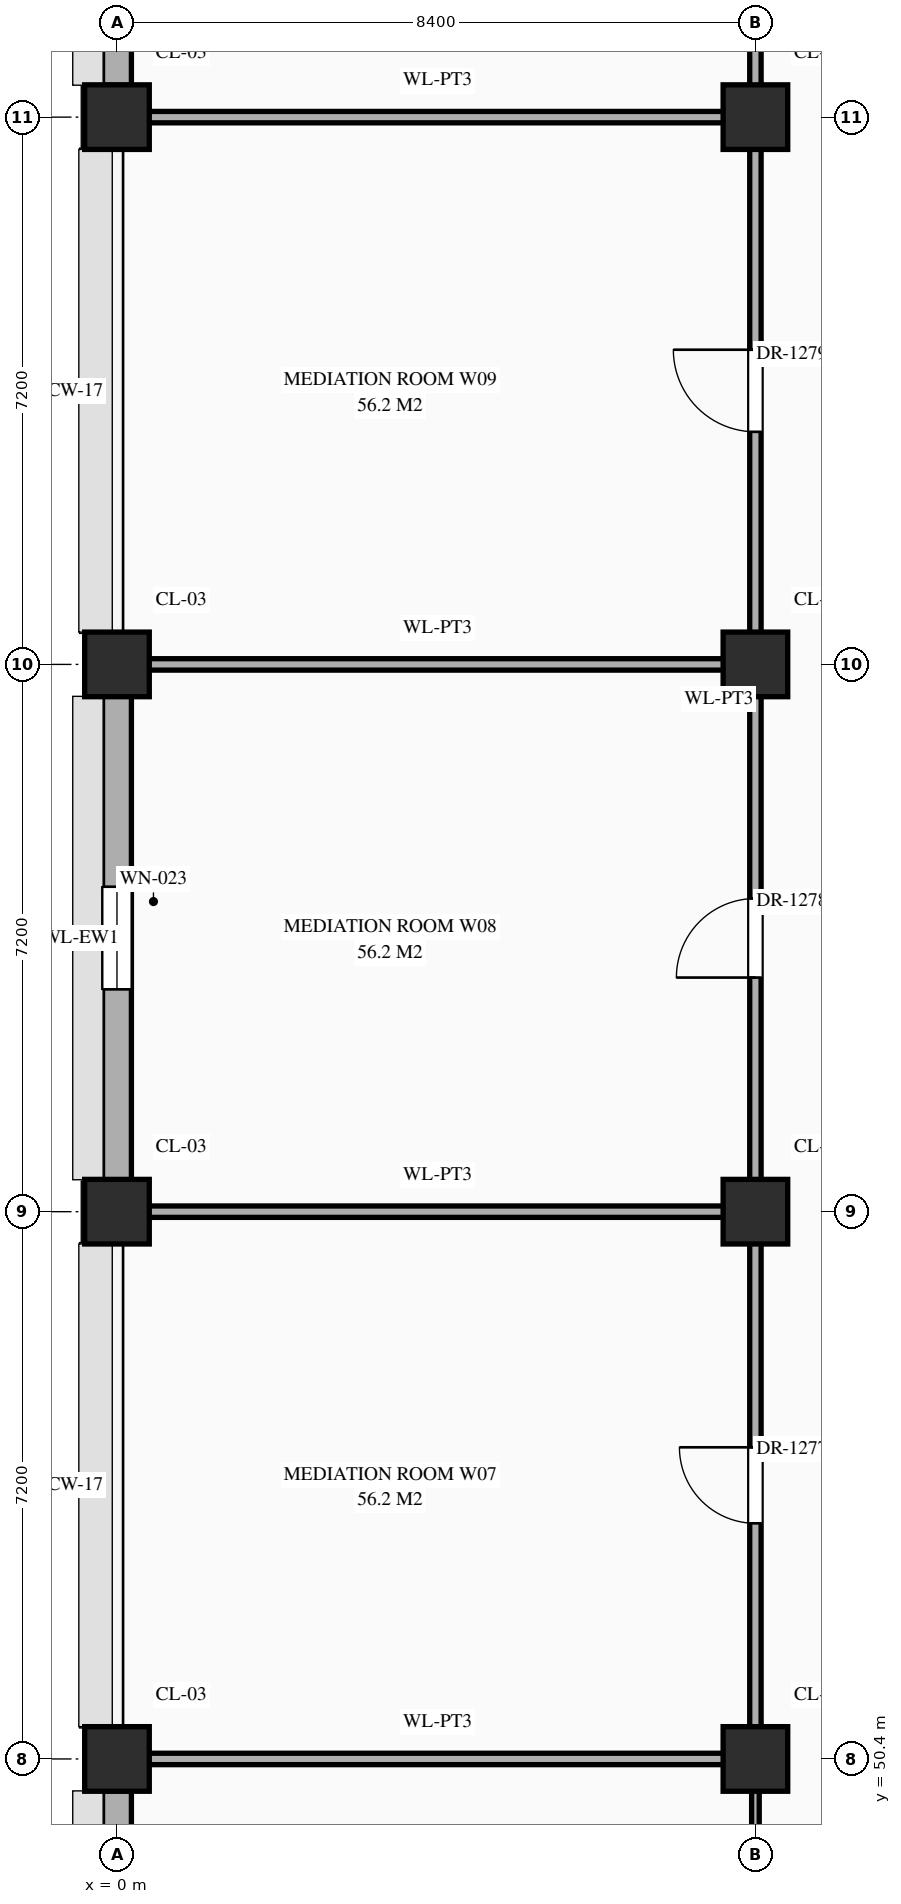
"""IFC4 building model, lengths in metres.
Left out: names, types, materials, properties, quantities, classifications, styles, units other than length and angle.
Written with IfcOpenShell. Run it as: python <this file> out.ifc"""

import sys

from ifc_helpers import new_model, si_unit, direction, frame, frame_2d, origin, origin_2d, place, context, subcontext, project, spatial, rectangle, extrude, element, fill, save


model = new_model("IFC4")
c1 = context("Model", 3, precision=1e-05, world=origin(), true_north=direction((0.0, 1.0)))
c2 = subcontext(c1, "Body", "Model", "MODEL_VIEW")
j1 = project(units=[si_unit("LENGTHUNIT", "METRE"), si_unit("PLANEANGLEUNIT", "RADIAN")], contexts=[c1])
p1 = place(None, origin())
s1 = spatial("IfcSite", under=j1, at=p1, CompositionType="ELEMENT")
p2 = place(p1, origin())
s2 = spatial("IfcBuilding", under=s1, at=p2, CompositionType="ELEMENT")
p3 = place(p2, frame((0.0, 0.0, 5.4)))
s3 = spatial("IfcBuildingStorey", under=s2, at=p3, CompositionType="ELEMENT", Elevation=5.4)
for number, where, z_axis, x_axis in (
    (1, (0.0, 50.4, 0.0), (0.0, 0.0, 1.0), (1.0, 0.0, 0.0)),
    (2, (0.0, 57.6, 0.0), (0.0, 0.0, 1.0), (1.0, 0.0, 0.0)),
    (3, (0.0, 64.8, 0.0), (0.0, 0.0, 1.0), (1.0, 0.0, 0.0)),
    (4, (0.0, 72.0, 0.0), (0.0, 0.0, 1.0), (1.0, 0.0, 0.0)),
    (5, (8.4, 50.4, 0.0), (0.0, 0.0, 1.0), (1.0, 0.0, 0.0)),
    (6, (8.4, 57.6, 0.0), (0.0, 0.0, 1.0), (1.0, 0.0, 0.0)),
    (7, (8.4, 64.8, 0.0), (0.0, 0.0, 1.0), (1.0, 0.0, 0.0)),
    (8, (8.4, 72.0, 0.0), (0.0, 0.0, 1.0), (1.0, 0.0, 0.0)),
):
    element("IfcColumn", number, at=place(p3, frame(where, z_axis=z_axis, x_axis=x_axis)), inside=s3, PredefinedType="COLUMN", context=c2, shape_type="SweptSolid", body=[
        extrude(rectangle(XDim=0.85, YDim=0.85, at=origin_2d()), origin(), (0.0, 0.0, 1.0), 5.4),
    ])
p4 = place(p3, frame((0.0, 43.62, 0.0), z_axis=(0.0, 0.0, 1.0), x_axis=(0.0, 1.0, 0.0)))
e9 = element("IfcWall", 9, at=p4, inside=s3, PredefinedType="STANDARD", context=c2, shape_type="SweptSolid", body=[
    extrude(rectangle(XDim=6.36, YDim=0.38, at=frame_2d((3.18, 0.0))), origin(), (0.0, 0.0, 1.0), 4.47),
])
p5 = place(p4, frame((2.505, 0.0, 0.85)))
e10 = element("IfcOpeningElement", 10, at=p5, cuts=e9, PredefinedType="OPENING", context=c2, shape_type="SweptSolid", body=[
    extrude(rectangle(XDim=1.35, YDim=1.56, at=frame_2d((0.675, 0.78))), frame((0.0, 0.202, 0.0), z_axis=(0.0, -1.0, 0.0), x_axis=(1.0, 0.0, 0.0)), (0.0, 0.0, 1.0), 0.404),
])
p6 = place(p3, frame((0.0, 58.02, 0.0), z_axis=(0.0, 0.0, 1.0), x_axis=(0.0, 1.0, 0.0)))
e11 = element("IfcWall", 11, at=p6, inside=s3, PredefinedType="STANDARD", context=c2, shape_type="SweptSolid", body=[
    extrude(rectangle(XDim=6.36, YDim=0.38, at=frame_2d((3.18, 0.0))), origin(), (0.0, 0.0, 1.0), 4.47),
])
p7 = place(p6, frame((2.505, 0.0, 0.85)))
e12 = element("IfcOpeningElement", 12, at=p7, cuts=e11, PredefinedType="OPENING", context=c2, shape_type="SweptSolid", body=[
    extrude(rectangle(XDim=1.35, YDim=1.92, at=frame_2d((0.675, 0.96))), frame((0.0, 0.202, 0.0), z_axis=(0.0, -1.0, 0.0), x_axis=(1.0, 0.0, 0.0)), (0.0, 0.0, 1.0), 0.404),
])
p8 = place(p3, frame((0.0, 72.42, 0.0), z_axis=(0.0, 0.0, 1.0), x_axis=(0.0, 1.0, 0.0)))
e13 = element("IfcWall", 13, at=p8, inside=s3, PredefinedType="STANDARD", context=c2, shape_type="SweptSolid", body=[
    extrude(rectangle(XDim=6.36, YDim=0.38, at=frame_2d((3.18, 0.0))), origin(), (0.0, 0.0, 1.0), 4.47),
])
p9 = place(p8, frame((2.405, 0.0, 0.85)))
e14 = element("IfcOpeningElement", 14, at=p9, cuts=e13, PredefinedType="OPENING", context=c2, shape_type="SweptSolid", body=[
    extrude(rectangle(XDim=1.55, YDim=1.2, at=frame_2d((0.775, 0.6))), frame((0.0, 0.202, 0.0), z_axis=(0.0, -1.0, 0.0), x_axis=(1.0, 0.0, 0.0)), (0.0, 0.0, 1.0), 0.404),
])
for number, where, z_axis, x_axis in (
    (15, (0.04, 50.4, 0.0), (0.0, 0.0, 1.0), (1.0, 0.0, 0.0)),
    (16, (0.04, 57.6, 0.0), (0.0, 0.0, 1.0), (1.0, 0.0, 0.0)),
    (17, (0.04, 64.8, 0.0), (0.0, 0.0, 1.0), (1.0, 0.0, 0.0)),
    (18, (0.04, 72.0, 0.0), (0.0, 0.0, 1.0), (1.0, 0.0, 0.0)),
):
    element("IfcWall", number, at=place(p3, frame(where, z_axis=z_axis, x_axis=x_axis)), inside=s3, PredefinedType="STANDARD", context=c2, shape_type="SweptSolid", body=[
        extrude(rectangle(XDim=8.36, YDim=0.15, at=frame_2d((4.18, 0.0))), origin(), (0.0, 0.0, 1.0), 4.27),
    ])
p10 = place(p3, frame((8.4, 43.2, 0.0), z_axis=(0.0, 0.0, 1.0), x_axis=(0.0, 1.0, 0.0)))
e19 = element("IfcWall", 19, at=p10, inside=s3, PredefinedType="STANDARD", context=c2, shape_type="SweptSolid", body=[
    extrude(rectangle(XDim=7.2, YDim=0.1, at=frame_2d((3.6, 0.0))), origin(), (0.0, 0.0, 1.0), 4.37),
])
p11 = place(p10, frame((0.913, 0.0, 0.0)))
e20 = element("IfcOpeningElement", 20, at=p11, cuts=e19, PredefinedType="OPENING", context=c2, shape_type="SweptSolid", body=[
    extrude(rectangle(XDim=0.92, YDim=2.15, at=frame_2d((0.46, 1.075))), frame((0.0, 0.062, 0.0), z_axis=(0.0, -1.0, 0.0), x_axis=(1.0, 0.0, 0.0)), (0.0, 0.0, 1.0), 0.124),
])
p12 = place(p10, frame((4.147, 0.0, 0.0)))
e21 = element("IfcOpeningElement", 21, at=p12, cuts=e19, PredefinedType="OPENING", context=c2, shape_type="SweptSolid", body=[
    extrude(rectangle(XDim=0.96, YDim=2.2, at=frame_2d((0.48, 1.1))), frame((0.0, 0.062, 0.0), z_axis=(0.0, -1.0, 0.0), x_axis=(1.0, 0.0, 0.0)), (0.0, 0.0, 1.0), 0.124),
])
p13 = place(p3, frame((8.4, 50.4, 0.0), z_axis=(0.0, 0.0, 1.0), x_axis=(0.0, 1.0, 0.0)))
e22 = element("IfcWall", 22, at=p13, inside=s3, PredefinedType="STANDARD", context=c2, shape_type="SweptSolid", body=[
    extrude(rectangle(XDim=33.6, YDim=0.15, at=frame_2d((16.8, 0.0))), origin(), (0.0, 0.0, 1.0), 4.37),
])
p14 = place(p13, frame((30.863, 0.0, 0.0)))
e23 = element("IfcOpeningElement", 23, at=p14, cuts=e22, PredefinedType="OPENING", context=c2, shape_type="SweptSolid", body=[
    extrude(rectangle(XDim=1.02, YDim=2.4, at=frame_2d((0.51, 1.2))), frame((0.0, 0.087, 0.0), z_axis=(0.0, -1.0, 0.0), x_axis=(1.0, 0.0, 0.0)), (0.0, 0.0, 1.0), 0.174),
])
p15 = place(p13, frame((3.1, 0.0, 0.0)))
e24 = element("IfcOpeningElement", 24, at=p15, cuts=e22, PredefinedType="OPENING", context=c2, shape_type="SweptSolid", body=[
    extrude(rectangle(XDim=1.0, YDim=2.25, at=frame_2d((0.5, 1.125))), frame((0.0, 0.087, 0.0), z_axis=(0.0, -1.0, 0.0), x_axis=(1.0, 0.0, 0.0)), (0.0, 0.0, 1.0), 0.174),
])
p16 = place(p13, frame((10.28, 0.0, 0.0)))
e25 = element("IfcOpeningElement", 25, at=p16, cuts=e22, PredefinedType="OPENING", context=c2, shape_type="SweptSolid", body=[
    extrude(rectangle(XDim=1.04, YDim=2.2, at=frame_2d((0.52, 1.1))), frame((0.0, 0.087, 0.0), z_axis=(0.0, -1.0, 0.0), x_axis=(1.0, 0.0, 0.0)), (0.0, 0.0, 1.0), 0.174),
])
p17 = place(p13, frame((17.46, 0.0, 0.0)))
e26 = element("IfcOpeningElement", 26, at=p17, cuts=e22, PredefinedType="OPENING", context=c2, shape_type="SweptSolid", body=[
    extrude(rectangle(XDim=1.08, YDim=2.25, at=frame_2d((0.54, 1.125))), frame((0.0, 0.087, 0.0), z_axis=(0.0, -1.0, 0.0), x_axis=(1.0, 0.0, 0.0)), (0.0, 0.0, 1.0), 0.174),
])
p18 = place(p13, frame((24.64, 0.0, 0.0)))
e27 = element("IfcOpeningElement", 27, at=p18, cuts=e22, PredefinedType="OPENING", context=c2, shape_type="SweptSolid", body=[
    extrude(rectangle(XDim=1.12, YDim=2.25, at=frame_2d((0.56, 1.125))), frame((0.0, 0.087, 0.0), z_axis=(0.0, -1.0, 0.0), x_axis=(1.0, 0.0, 0.0)), (0.0, 0.0, 1.0), 0.174),
])
p19 = place(p7, origin())
e28 = element("IfcWindow", 28, at=p19, inside=s3, PartitioningType="SINGLE_PANEL", PredefinedType="WINDOW", context=c2, shape_type="SweptSolid", body=[
    extrude(rectangle(XDim=1.35, YDim=1.92, at=frame_2d((0.675, 0.96))), frame((0.0, 0.03, 0.0), z_axis=(0.0, -1.0, 0.0), x_axis=(1.0, 0.0, 0.0)), (0.0, 0.0, 1.0), 0.06),
])
fill(e12, e28)
p20 = place(p15, origin())
e29 = element("IfcDoor", 29, at=p20, inside=s3, OperationType="SINGLE_SWING_RIGHT", PredefinedType="DOOR", context=c2, shape_type="SweptSolid", body=[
    extrude(rectangle(XDim=1.0, YDim=2.25, at=frame_2d((0.5, 1.125))), frame((0.0, 0.025, 0.0), z_axis=(0.0, -1.0, 0.0), x_axis=(1.0, 0.0, 0.0)), (0.0, 0.0, 1.0), 0.05),
])
fill(e24, e29)
p21 = place(p16, origin())
e30 = element("IfcDoor", 30, at=p21, inside=s3, OperationType="SINGLE_SWING_LEFT", PredefinedType="DOOR", context=c2, shape_type="SweptSolid", body=[
    extrude(rectangle(XDim=1.04, YDim=2.2, at=frame_2d((0.52, 1.1))), frame((0.0, 0.025, 0.0), z_axis=(0.0, -1.0, 0.0), x_axis=(1.0, 0.0, 0.0)), (0.0, 0.0, 1.0), 0.05),
])
fill(e25, e30)
p22 = place(p17, origin())
e31 = element("IfcDoor", 31, at=p22, inside=s3, OperationType="SINGLE_SWING_RIGHT", PredefinedType="DOOR", context=c2, shape_type="SweptSolid", body=[
    extrude(rectangle(XDim=1.08, YDim=2.25, at=frame_2d((0.54, 1.125))), frame((0.0, 0.025, 0.0), z_axis=(0.0, -1.0, 0.0), x_axis=(1.0, 0.0, 0.0)), (0.0, 0.0, 1.0), 0.05),
])
fill(e26, e31)
save(model, sys.argv[1])
